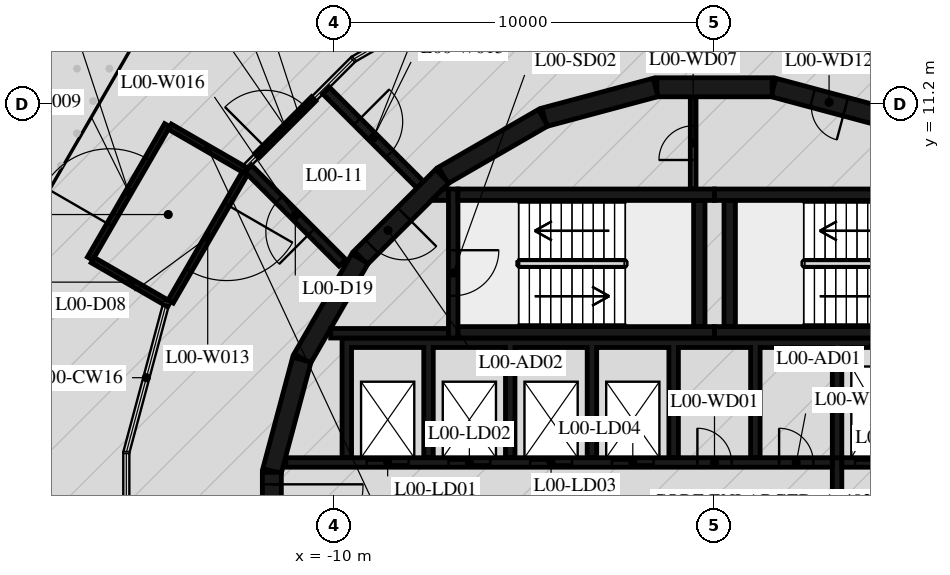
"""IFC4 building model, lengths in metres.
Left out: names, types, materials, properties, quantities, classifications, styles, units other than length and angle.
Written with IfcOpenShell. Run it as: python <this file> out.ifc"""

import sys

from ifc_helpers import new_model, si_unit, direction, frame, frame_2d, origin, place, context, subcontext, project, spatial, polyline, rectangle, outline, extrude, element, fill, save


model = new_model("IFC4")
c1 = context("Model", 3, precision=1e-05, world=origin(), true_north=direction((0.0, 1.0)))
c2 = subcontext(c1, "Body", "Model", "MODEL_VIEW")
j1 = project(units=[si_unit("LENGTHUNIT", "METRE"), si_unit("PLANEANGLEUNIT", "RADIAN")], contexts=[c1])
p1 = place(None, origin())
s1 = spatial("IfcSite", under=j1, at=p1, CompositionType="ELEMENT")
p2 = place(p1, origin())
s2 = spatial("IfcBuilding", under=s1, at=p2, CompositionType="ELEMENT")
p3 = place(p2, origin())
s3 = spatial("IfcBuildingStorey", under=s2, at=p3, CompositionType="ELEMENT", Elevation=0.0)
p4 = place(p3, frame((-12.032, 9.855, 0.0), z_axis=(0.0, 0.0, 1.0), x_axis=(0.70704865247, 0.707164905125, 0.0)))
e1 = element("IfcWall", 1, at=p4, inside=s3, PredefinedType="STANDARD", context=c2, shape_type="SweptSolid", body=[
    extrude(rectangle(XDim=2.1, YDim=0.16, at=frame_2d((1.05, 0.0))), origin(), (0.0, 0.0, 1.0), 8.5),
])
p5 = place(p4, frame((0.3, 0.0, 0.0)))
e2 = element("IfcOpeningElement", 2, at=p5, cuts=e1, PredefinedType="OPENING", context=c2, shape_type="SweptSolid", body=[
    extrude(rectangle(XDim=1.5, YDim=2.1, at=frame_2d((0.75, 1.05))), frame((0.0, 0.09, 0.0), z_axis=(0.0, -1.0, 0.0), x_axis=(1.0, 0.0, 0.0)), (0.0, 0.0, 1.0), 0.18),
])
p6 = place(p3, frame((4.479, 10.858, 0.0), z_axis=(0.0, 0.0, 1.0), x_axis=(-0.965948410781, 0.258734743916, 0.0)))
e3 = element("IfcWall", 3, at=p6, inside=s3, PredefinedType="SHEAR", context=c2, shape_type="SweptSolid", body=[
    extrude(rectangle(XDim=3.033, YDim=0.5, at=frame_2d((1.516, 0.0))), origin(), (0.0, 0.0, 1.0), 8.62),
])
p7 = place(p6, frame((1.066, 0.0, 0.0)))
e4 = element("IfcOpeningElement", 4, at=p7, cuts=e3, PredefinedType="OPENING", context=c2, shape_type="SweptSolid", body=[
    extrude(rectangle(XDim=0.9, YDim=2.1, at=frame_2d((0.45, 1.05))), frame((0.0, 0.26, 0.0), z_axis=(0.0, -1.0, 0.0), x_axis=(1.0, 0.0, 0.0)), (0.0, 0.0, 1.0), 0.52),
])
for number, where, z_axis, x_axis in (
    (5, (1.516, 11.647, 0.0), (0.0, 0.0, 1.0), (-1.0, 0.0, 0.0)),
    (6, (-1.55, 11.643, 0.0), (0.0, 0.0, 1.0), (-0.966, -0.259, 0.0)),
    (7, (-4.51, 10.845, 0.0), (0.0, 0.0, 1.0), (-0.866, -0.5, 0.0)),
):
    element("IfcWall", number, at=place(p3, frame(where, z_axis=z_axis, x_axis=x_axis)), inside=s3, PredefinedType="SHEAR", context=c2, shape_type="SweptSolid", body=[
        extrude(rectangle(XDim=3.033, YDim=0.5, at=frame_2d((1.516, 0.0))), origin(), (0.0, 0.0, 1.0), 8.62),
    ])
p8 = place(p3, frame((-7.164, 9.308, 0.0), z_axis=(0.0, 0.0, 1.0), x_axis=(-0.707106781187, -0.707106781187, 0.0)))
e8 = element("IfcWall", 8, at=p8, inside=s3, PredefinedType="SHEAR", context=c2, shape_type="SweptSolid", body=[
    extrude(rectangle(XDim=3.032, YDim=0.5, at=frame_2d((1.516, 0.0))), origin(), (0.0, 0.0, 1.0), 8.62),
])
p9 = place(p8, frame((1.416, 0.0, 0.0)))
e9 = element("IfcOpeningElement", 9, at=p9, cuts=e8, PredefinedType="OPENING", context=c2, shape_type="SweptSolid", body=[
    extrude(rectangle(XDim=1.2, YDim=2.1, at=frame_2d((0.6, 1.05))), frame((0.0, 0.26, 0.0), z_axis=(0.0, -1.0, 0.0), x_axis=(1.0, 0.0, 0.0)), (0.0, 0.0, 1.0), 0.52),
])
for number, where, z_axis, x_axis in (
    (10, (-9.329, 7.137, 0.0), (0.0, 0.0, 1.0), (-0.5, -0.866, 0.0)),
    (11, (-10.858, 4.479, 0.0), (0.0, 0.0, 1.0), (-0.259, -0.966, 0.0)),
):
    element("IfcWall", number, at=place(p3, frame(where, z_axis=z_axis, x_axis=x_axis)), inside=s3, PredefinedType="SHEAR", context=c2, shape_type="SweptSolid", body=[
        extrude(rectangle(XDim=3.033, YDim=0.5, at=frame_2d((1.516, 0.0))), origin(), (0.0, 0.0, 1.0), 8.62),
    ])
p10 = place(p3, frame((-11.647, 1.516, 0.0), z_axis=(0.0, 0.0, 1.0), x_axis=(0.0, -1.0, 0.0)))
e12 = element("IfcWall", 12, at=p10, inside=s3, PredefinedType="SHEAR", context=c2, shape_type="SweptSolid", body=[
    extrude(rectangle(XDim=3.033, YDim=0.5, at=frame_2d((1.516, 0.0))), origin(), (0.0, 0.0, 1.0), 8.62),
])
p11 = place(p10, frame((0.316, 0.0, 0.0)))
e13 = element("IfcOpeningElement", 13, at=p11, cuts=e12, PredefinedType="OPENING", context=c2, shape_type="SweptSolid", body=[
    extrude(rectangle(XDim=2.4, YDim=2.1, at=frame_2d((1.2, 1.05))), frame((0.0, 0.26, 0.0), z_axis=(0.0, -1.0, 0.0), x_axis=(1.0, 0.0, 0.0)), (0.0, 0.0, 1.0), 0.52),
])
for number, where, z_axis, x_axis in (
    (14, (0.0, 5.2, 0.0), (0.0, 0.0, 1.0), (1.0, 0.0, 0.0)),
    (15, (0.0, 8.82, 0.0), (0.0, 0.0, 1.0), (1.0, 0.0, 0.0)),
):
    element("IfcWall", number, at=place(p3, frame(where, z_axis=z_axis, x_axis=x_axis)), inside=s3, PredefinedType="SHEAR", context=c2, shape_type="SweptSolid", body=[
        extrude(rectangle(XDim=6.75, YDim=0.3, at=frame_2d((3.375, 0.0))), origin(), (0.0, 0.0, 1.0), 8.62),
    ])
p12 = place(p3, frame((0.4, 5.35, 0.0), z_axis=(0.0, 0.0, 1.0), x_axis=(0.0, 1.0, 0.0)))
e16 = element("IfcWall", 16, at=p12, inside=s3, PredefinedType="SHEAR", context=c2, shape_type="SweptSolid", body=[
    extrude(rectangle(XDim=3.32, YDim=0.3, at=frame_2d((1.66, 0.0))), origin(), (0.0, 0.0, 1.0), 8.62),
])
for number, where, z_axis, x_axis in (
    (17, (-6.75, 5.2, 0.0), (0.0, 0.0, 1.0), (1.0, 0.0, 0.0)),
    (18, (-6.75, 8.82, 0.0), (0.0, 0.0, 1.0), (1.0, 0.0, 0.0)),
):
    element("IfcWall", number, at=place(p3, frame(where, z_axis=z_axis, x_axis=x_axis)), inside=s3, PredefinedType="SHEAR", context=c2, shape_type="SweptSolid", body=[
        extrude(rectangle(XDim=6.75, YDim=0.3, at=frame_2d((3.375, 0.0))), origin(), (0.0, 0.0, 1.0), 8.62),
    ])
p13 = place(p3, frame((-0.4, 5.35, 0.0), z_axis=(0.0, 0.0, 1.0), x_axis=(0.0, 1.0, 0.0)))
e19 = element("IfcWall", 19, at=p13, inside=s3, PredefinedType="SHEAR", context=c2, shape_type="SweptSolid", body=[
    extrude(rectangle(XDim=3.32, YDim=0.3, at=frame_2d((1.66, 0.0))), origin(), (0.0, 0.0, 1.0), 8.62),
])
p14 = place(p3, frame((-6.875, 8.97, 0.0), z_axis=(0.0, 0.0, 1.0), x_axis=(0.0, -1.0, 0.0)))
e20 = element("IfcWall", 20, at=p14, inside=s3, PredefinedType="SHEAR", context=c2, shape_type="SweptSolid", body=[
    extrude(rectangle(XDim=3.92, YDim=0.25, at=frame_2d((1.96, 0.0))), origin(), (0.0, 0.0, 1.0), 8.62),
])
p15 = place(p14, frame((1.61, 0.0, 0.0)))
e21 = element("IfcOpeningElement", 21, at=p15, cuts=e20, PredefinedType="OPENING", context=c2, shape_type="SweptSolid", body=[
    extrude(rectangle(XDim=1.2, YDim=2.1, at=frame_2d((0.6, 1.05))), frame((0.0, 0.135, 0.0), z_axis=(0.0, -1.0, 0.0), x_axis=(1.0, 0.0, 0.0)), (0.0, 0.0, 1.0), 0.27),
])
p16 = place(p3, frame((-7.0, 5.175, 0.0), z_axis=(0.0, 0.0, 1.0), x_axis=(-1.0, 0.0, 0.0)))
e22 = element("IfcWall", 22, at=p16, inside=s3, PredefinedType="SHEAR", context=c2, shape_type="SweptSolid", body=[
    extrude(rectangle(XDim=3.1, YDim=0.25, at=frame_2d((1.55, 0.0))), origin(), (0.0, 0.0, 1.0), 8.62),
])
p17 = place(p3, origin())
e23 = element("IfcWall", 23, at=p17, inside=s3, PredefinedType="SHEAR", context=c2, shape_type="SweptSolid", body=[
    extrude(outline(polyline([(-7.148, 8.97), (-7.0, 8.97), (-7.0, 8.67), (-7.448, 8.67), (-7.148, 8.97)])), origin(), (0.0, 0.0, 1.0), 8.62),
])
p18 = place(p3, origin())
e24 = element("IfcWall", 24, at=p18, inside=s3, PredefinedType="SHEAR", context=c2, shape_type="SweptSolid", body=[
    extrude(outline(polyline([(-9.55, 4.8), (-7.65, 4.8), (-7.65, 1.9), (-7.4, 1.9), (-7.4, 4.8), (-5.5, 4.8), (-5.5, 1.9), (-5.25, 1.9), (-5.25, 4.8), (-3.35, 4.8), (-3.35, 1.9), (-3.1, 1.9), (-3.1, 4.8), (-1.2, 4.8), (-1.2, 1.9), (-0.95, 1.9), (-0.95, 4.8), (0.95, 4.8), (0.95, 1.9), (1.2, 1.9), (1.2, 4.8), (3.1, 4.8), (3.1, 1.9), (3.35, 1.9), (3.35, 4.8), (5.25, 4.8), (5.25, 1.9), (5.5, 1.9), (5.5, 4.8), (7.4, 4.8), (7.4, 1.9), (7.65, 1.9), (7.65, 4.8), (9.55, 4.8), (9.55, 1.9), (9.8, 1.9), (9.8, 4.8), (9.8, 5.05), (-9.8, 5.05), (-9.8, 4.8), (-9.8, 1.9), (-9.55, 1.9), (-9.55, 4.8)])), origin(), (0.0, 0.0, 1.0), 8.62),
])
p19 = place(p3, frame((-11.28, 1.775, 0.0), z_axis=(0.0, 0.0, 1.0), x_axis=(1.0, 0.0, 0.0)))
e25 = element("IfcWall", 25, at=p19, inside=s3, PredefinedType="SHEAR", context=c2, shape_type="SweptSolid", body=[
    extrude(rectangle(XDim=14.38, YDim=0.25, at=frame_2d((7.19, 0.0))), origin(), (0.0, 0.0, 1.0), 8.62),
])
p20 = place(p19, frame((2.13, 0.0, 0.0)))
e26 = element("IfcOpeningElement", 26, at=p20, cuts=e25, PredefinedType="OPENING", context=c2, shape_type="SweptSolid", body=[
    extrude(rectangle(XDim=1.1, YDim=2.1, at=frame_2d((0.55, 1.05))), frame((0.0, 0.135, 0.0), z_axis=(0.0, -1.0, 0.0), x_axis=(1.0, 0.0, 0.0)), (0.0, 0.0, 1.0), 0.27),
])
p21 = place(p19, frame((4.28, 0.0, 0.0)))
e27 = element("IfcOpeningElement", 27, at=p21, cuts=e25, PredefinedType="OPENING", context=c2, shape_type="SweptSolid", body=[
    extrude(rectangle(XDim=1.1, YDim=2.1, at=frame_2d((0.55, 1.05))), frame((0.0, 0.135, 0.0), z_axis=(0.0, -1.0, 0.0), x_axis=(1.0, 0.0, 0.0)), (0.0, 0.0, 1.0), 0.27),
])
p22 = place(p19, frame((6.43, 0.0, 0.0)))
e28 = element("IfcOpeningElement", 28, at=p22, cuts=e25, PredefinedType="OPENING", context=c2, shape_type="SweptSolid", body=[
    extrude(rectangle(XDim=1.1, YDim=2.1, at=frame_2d((0.55, 1.05))), frame((0.0, 0.135, 0.0), z_axis=(0.0, -1.0, 0.0), x_axis=(1.0, 0.0, 0.0)), (0.0, 0.0, 1.0), 0.27),
])
p23 = place(p19, frame((8.58, 0.0, 0.0)))
e29 = element("IfcOpeningElement", 29, at=p23, cuts=e25, PredefinedType="OPENING", context=c2, shape_type="SweptSolid", body=[
    extrude(rectangle(XDim=1.1, YDim=2.1, at=frame_2d((0.55, 1.05))), frame((0.0, 0.135, 0.0), z_axis=(0.0, -1.0, 0.0), x_axis=(1.0, 0.0, 0.0)), (0.0, 0.0, 1.0), 0.27),
])
p24 = place(p19, frame((10.83, 0.0, 0.0)))
e30 = element("IfcOpeningElement", 30, at=p24, cuts=e25, PredefinedType="OPENING", context=c2, shape_type="SweptSolid", body=[
    extrude(rectangle(XDim=0.9, YDim=2.1, at=frame_2d((0.45, 1.05))), frame((0.0, 0.135, 0.0), z_axis=(0.0, -1.0, 0.0), x_axis=(1.0, 0.0, 0.0)), (0.0, 0.0, 1.0), 0.27),
])
p25 = place(p19, frame((12.98, 0.0, 0.0)))
e31 = element("IfcOpeningElement", 31, at=p25, cuts=e25, PredefinedType="OPENING", context=c2, shape_type="SweptSolid", body=[
    extrude(rectangle(XDim=0.9, YDim=2.1, at=frame_2d((0.45, 1.05))), frame((0.0, 0.135, 0.0), z_axis=(0.0, -1.0, 0.0), x_axis=(1.0, 0.0, 0.0)), (0.0, 0.0, 1.0), 0.27),
])
p26 = place(p3, frame((3.35, 1.775, 0.0), z_axis=(0.0, 0.0, 1.0), x_axis=(1.0, 0.0, 0.0)))
e32 = element("IfcWall", 32, at=p26, inside=s3, PredefinedType="SHEAR", context=c2, shape_type="SweptSolid", body=[
    extrude(rectangle(XDim=7.93, YDim=0.25, at=frame_2d((3.965, 0.0))), origin(), (0.0, 0.0, 1.0), 8.62),
])
p27 = place(p26, frame((0.35, 0.0, 0.0)))
e33 = element("IfcOpeningElement", 33, at=p27, cuts=e32, PredefinedType="OPENING", context=c2, shape_type="SweptSolid", body=[
    extrude(rectangle(XDim=1.2, YDim=2.4, at=frame_2d((0.6, 1.2))), frame((0.0, 0.135, 0.0), z_axis=(0.0, -1.0, 0.0), x_axis=(1.0, 0.0, 0.0)), (0.0, 0.0, 1.0), 0.27),
])
p28 = place(p26, frame((2.5, 0.0, 0.0)))
e34 = element("IfcOpeningElement", 34, at=p28, cuts=e32, PredefinedType="OPENING", context=c2, shape_type="SweptSolid", body=[
    extrude(rectangle(XDim=1.2, YDim=2.4, at=frame_2d((0.6, 1.2))), frame((0.0, 0.135, 0.0), z_axis=(0.0, -1.0, 0.0), x_axis=(1.0, 0.0, 0.0)), (0.0, 0.0, 1.0), 0.27),
])
p29 = place(p26, frame((4.8, 0.0, 0.0)))
e35 = element("IfcOpeningElement", 35, at=p29, cuts=e32, PredefinedType="OPENING", context=c2, shape_type="SweptSolid", body=[
    extrude(rectangle(XDim=0.9, YDim=2.1, at=frame_2d((0.45, 1.05))), frame((0.0, 0.135, 0.0), z_axis=(0.0, -1.0, 0.0), x_axis=(1.0, 0.0, 0.0)), (0.0, 0.0, 1.0), 0.27),
])
p30 = place(p3, frame((3.225, -1.9, 0.0), z_axis=(0.0, 0.0, 1.0), x_axis=(0.0, 1.0, 0.0)))
e36 = element("IfcWall", 36, at=p30, inside=s3, PredefinedType="SHEAR", context=c2, shape_type="SweptSolid", body=[
    extrude(rectangle(XDim=3.8, YDim=0.25, at=frame_2d((1.9, 0.0))), origin(), (0.0, 0.0, 1.0), 8.62),
])
p31 = place(p3, frame((-0.562, 8.97, 0.0), z_axis=(0.0, 0.0, 1.0), x_axis=(0.0, 1.0, 0.0)))
e37 = element("IfcWall", 37, at=p31, inside=s3, PredefinedType="PARTITIONING", context=c2, shape_type="SweptSolid", body=[
    extrude(rectangle(XDim=2.427, YDim=0.15, at=frame_2d((1.214, 0.0))), origin(), (0.0, 0.0, 1.0), 8.62),
])
p32 = place(p31, frame((0.764, 0.0, 0.0)))
e38 = element("IfcOpeningElement", 38, at=p32, cuts=e37, PredefinedType="OPENING", context=c2, shape_type="SweptSolid", body=[
    extrude(rectangle(XDim=0.9, YDim=2.1, at=frame_2d((0.45, 1.05))), frame((0.0, 0.085, 0.0), z_axis=(0.0, -1.0, 0.0), x_axis=(1.0, 0.0, 0.0)), (0.0, 0.0, 1.0), 0.17),
])
p33 = place(p3, frame((-16.43, 7.14, 0.0), z_axis=(0.0, 0.0, 1.0), x_axis=(0.500651722248, 0.865648804661, 0.0)))
e39 = element("IfcWall", 39, at=p33, inside=s3, PredefinedType="PARTITIONING", context=c2, shape_type="SweptSolid", body=[
    extrude(rectangle(XDim=4.055, YDim=0.16, at=frame_2d((2.027, 0.0))), origin(), (0.0, 0.0, 1.0), 3.0),
])
p34 = place(p33, frame((1.027, 0.0, 0.0)))
e40 = element("IfcOpeningElement", 40, at=p34, cuts=e39, PredefinedType="OPENING", context=c2, shape_type="SweptSolid", body=[
    extrude(rectangle(XDim=2.0, YDim=2.4, at=frame_2d((1.0, 1.2))), frame((0.0, 0.09, 0.0), z_axis=(0.0, -1.0, 0.0), x_axis=(1.0, 0.0, 0.0)), (0.0, 0.0, 1.0), 0.18),
])
p35 = place(p3, frame((-14.331, 10.61, 0.0), z_axis=(0.0, 0.0, 1.0), x_axis=(0.866164575005, -0.499758870863, 0.0)))
e41 = element("IfcWall", 41, at=p35, inside=s3, PredefinedType="PARTITIONING", context=c2, shape_type="SweptSolid", body=[
    extrude(rectangle(XDim=2.322, YDim=0.16, at=frame_2d((1.161, 0.0))), origin(), (0.0, 0.0, 1.0), 3.0),
])
p36 = place(p3, frame((-14.35, 5.94, 0.0), z_axis=(0.0, 0.0, 1.0), x_axis=(-0.866138304741, 0.499804398801, 0.0)))
e42 = element("IfcWall", 42, at=p36, inside=s3, PredefinedType="PARTITIONING", context=c2, shape_type="SweptSolid", body=[
    extrude(rectangle(XDim=2.321, YDim=0.16, at=frame_2d((1.161, 0.0))), origin(), (0.0, 0.0, 1.0), 3.0),
])
p37 = place(p3, frame((-12.36, 9.381, 0.0), z_axis=(0.0, 0.0, 1.0), x_axis=(-0.500648288507, -0.86565079057, 0.0)))
e43 = element("IfcWall", 43, at=p37, inside=s3, PredefinedType="PARTITIONING", context=c2, shape_type="SweptSolid", body=[
    extrude(rectangle(XDim=3.895, YDim=0.16, at=frame_2d((1.947, 0.0))), origin(), (0.0, 0.0, 1.0), 3.0),
])
p38 = place(p37, frame((0.948, 0.0, 0.0)))
e44 = element("IfcOpeningElement", 44, at=p38, cuts=e43, PredefinedType="OPENING", context=c2, shape_type="SweptSolid", body=[
    extrude(rectangle(XDim=2.0, YDim=2.4, at=frame_2d((1.0, 1.2))), frame((0.0, 0.09, 0.0), z_axis=(0.0, -1.0, 0.0), x_axis=(1.0, 0.0, 0.0)), (0.0, 0.0, 1.0), 0.18),
])
p39 = place(p3, frame((-10.22, 11.56, 0.0), z_axis=(0.0, 0.0, 1.0), x_axis=(0.707106781187, -0.707106781187, 0.0)))
e45 = element("IfcWall", 45, at=p39, inside=s3, PredefinedType="PARTITIONING", context=c2, shape_type="SweptSolid", body=[
    extrude(rectangle(XDim=3.507, YDim=0.25, at=frame_2d((1.754, 0.0))), origin(), (0.0, 0.0, 1.0), 8.62),
])
p40 = place(p39, frame((1.154, 0.0, 0.0)))
e46 = element("IfcOpeningElement", 46, at=p40, cuts=e45, PredefinedType="OPENING", context=c2, shape_type="SweptSolid", body=[
    extrude(rectangle(XDim=1.2, YDim=2.1, at=frame_2d((0.6, 1.05))), frame((0.0, 0.135, 0.0), z_axis=(0.0, -1.0, 0.0), x_axis=(1.0, 0.0, 0.0)), (0.0, 0.0, 1.0), 0.27),
])
p41 = place(p3, frame((-9.79, 7.03, 0.0), z_axis=(0.0, 0.0, 1.0), x_axis=(-0.707106781187, 0.707106781187, 0.0)))
e47 = element("IfcWall", 47, at=p41, inside=s3, PredefinedType="PARTITIONING", context=c2, shape_type="SweptSolid", body=[
    extrude(rectangle(XDim=3.507, YDim=0.25, at=frame_2d((1.754, 0.0))), origin(), (0.0, 0.0, 1.0), 8.62),
])
p42 = place(p41, frame((1.154, 0.0, 0.0)))
e48 = element("IfcOpeningElement", 48, at=p42, cuts=e47, PredefinedType="OPENING", context=c2, shape_type="SweptSolid", body=[
    extrude(rectangle(XDim=1.2, YDim=2.1, at=frame_2d((0.6, 1.05))), frame((0.0, 0.135, 0.0), z_axis=(0.0, -1.0, 0.0), x_axis=(1.0, 0.0, 0.0)), (0.0, 0.0, 1.0), 0.27),
])
p43 = place(p5, origin())
e49 = element("IfcDoor", 49, at=p43, inside=s3, OperationType="DOUBLE_DOOR_SINGLE_SWING", PredefinedType="DOOR", context=c2, shape_type="SweptSolid", body=[
    extrude(rectangle(XDim=1.5, YDim=2.1, at=frame_2d((0.75, 1.05))), frame((0.0, 0.025, 0.0), z_axis=(0.0, -1.0, 0.0), x_axis=(1.0, 0.0, 0.0)), (0.0, 0.0, 1.0), 0.05),
])
fill(e2, e49)
p44 = place(p15, origin())
e50 = element("IfcDoor", 50, at=p44, inside=s3, OperationType="SINGLE_SWING_LEFT", PredefinedType="DOOR", context=c2, shape_type="SweptSolid", body=[
    extrude(rectangle(XDim=1.2, YDim=2.1, at=frame_2d((0.6, 1.05))), frame((0.0, 0.025, 0.0), z_axis=(0.0, -1.0, 0.0), x_axis=(1.0, 0.0, 0.0)), (0.0, 0.0, 1.0), 0.05),
])
fill(e21, e50)
p45 = place(p9, origin())
e51 = element("IfcDoor", 51, at=p45, inside=s3, OperationType="SINGLE_SWING_RIGHT", PredefinedType="DOOR", context=c2, shape_type="SweptSolid", body=[
    extrude(rectangle(XDim=1.2, YDim=2.1, at=frame_2d((0.6, 1.05))), frame((0.0, 0.025, 0.0), z_axis=(0.0, -1.0, 0.0), x_axis=(1.0, 0.0, 0.0)), (0.0, 0.0, 1.0), 0.05),
])
fill(e9, e51)
p46 = place(p11, origin())
e52 = element("IfcDoor", 52, at=p46, inside=s3, OperationType="DOUBLE_DOOR_SINGLE_SWING", PredefinedType="DOOR", context=c2, shape_type="SweptSolid", body=[
    extrude(rectangle(XDim=2.4, YDim=2.1, at=frame_2d((1.2, 1.05))), frame((0.0, 0.025, 0.0), z_axis=(0.0, -1.0, 0.0), x_axis=(1.0, 0.0, 0.0)), (0.0, 0.0, 1.0), 0.05),
])
fill(e13, e52)
p47 = place(p20, origin())
e53 = element("IfcDoor", 53, at=p47, inside=s3, OperationType="DOUBLE_DOOR_SLIDING", PredefinedType="DOOR", context=c2, shape_type="SweptSolid", body=[
    extrude(rectangle(XDim=1.1, YDim=2.1, at=frame_2d((0.55, 1.05))), frame((0.0, 0.025, 0.0), z_axis=(0.0, -1.0, 0.0), x_axis=(1.0, 0.0, 0.0)), (0.0, 0.0, 1.0), 0.05),
])
fill(e26, e53)
p48 = place(p21, origin())
e54 = element("IfcDoor", 54, at=p48, inside=s3, OperationType="DOUBLE_DOOR_SLIDING", PredefinedType="DOOR", context=c2, shape_type="SweptSolid", body=[
    extrude(rectangle(XDim=1.1, YDim=2.1, at=frame_2d((0.55, 1.05))), frame((0.0, 0.025, 0.0), z_axis=(0.0, -1.0, 0.0), x_axis=(1.0, 0.0, 0.0)), (0.0, 0.0, 1.0), 0.05),
])
fill(e27, e54)
p49 = place(p22, origin())
e55 = element("IfcDoor", 55, at=p49, inside=s3, OperationType="DOUBLE_DOOR_SLIDING", PredefinedType="DOOR", context=c2, shape_type="SweptSolid", body=[
    extrude(rectangle(XDim=1.1, YDim=2.1, at=frame_2d((0.55, 1.05))), frame((0.0, 0.025, 0.0), z_axis=(0.0, -1.0, 0.0), x_axis=(1.0, 0.0, 0.0)), (0.0, 0.0, 1.0), 0.05),
])
fill(e28, e55)
p50 = place(p23, origin())
e56 = element("IfcDoor", 56, at=p50, inside=s3, OperationType="DOUBLE_DOOR_SLIDING", PredefinedType="DOOR", context=c2, shape_type="SweptSolid", body=[
    extrude(rectangle(XDim=1.1, YDim=2.1, at=frame_2d((0.55, 1.05))), frame((0.0, 0.025, 0.0), z_axis=(0.0, -1.0, 0.0), x_axis=(1.0, 0.0, 0.0)), (0.0, 0.0, 1.0), 0.05),
])
fill(e29, e56)
p51 = place(p27, origin())
e57 = element("IfcDoor", 57, at=p51, inside=s3, OperationType="DOUBLE_DOOR_SLIDING", PredefinedType="DOOR", context=c2, shape_type="SweptSolid", body=[
    extrude(rectangle(XDim=1.2, YDim=2.4, at=frame_2d((0.6, 1.2))), frame((0.0, 0.025, 0.0), z_axis=(0.0, -1.0, 0.0), x_axis=(1.0, 0.0, 0.0)), (0.0, 0.0, 1.0), 0.05),
])
fill(e33, e57)
p52 = place(p24, origin())
e58 = element("IfcDoor", 58, at=p52, inside=s3, OperationType="SINGLE_SWING_RIGHT", PredefinedType="DOOR", context=c2, shape_type="SweptSolid", body=[
    extrude(rectangle(XDim=0.9, YDim=2.1, at=frame_2d((0.45, 1.05))), frame((0.0, 0.025, 0.0), z_axis=(0.0, -1.0, 0.0), x_axis=(1.0, 0.0, 0.0)), (0.0, 0.0, 1.0), 0.05),
])
fill(e30, e58)
p53 = place(p25, origin())
e59 = element("IfcDoor", 59, at=p53, inside=s3, OperationType="SINGLE_SWING_LEFT", PredefinedType="DOOR", context=c2, shape_type="SweptSolid", body=[
    extrude(rectangle(XDim=0.9, YDim=2.1, at=frame_2d((0.45, 1.05))), frame((0.0, 0.025, 0.0), z_axis=(0.0, -1.0, 0.0), x_axis=(1.0, 0.0, 0.0)), (0.0, 0.0, 1.0), 0.05),
])
fill(e31, e59)
p54 = place(p32, origin())
e60 = element("IfcDoor", 60, at=p54, inside=s3, OperationType="SINGLE_SWING_RIGHT", PredefinedType="DOOR", context=c2, shape_type="SweptSolid", body=[
    extrude(rectangle(XDim=0.9, YDim=2.1, at=frame_2d((0.45, 1.05))), frame((0.0, 0.025, 0.0), z_axis=(0.0, -1.0, 0.0), x_axis=(1.0, 0.0, 0.0)), (0.0, 0.0, 1.0), 0.05),
])
fill(e38, e60)
p55 = place(p7, origin())
e61 = element("IfcDoor", 61, at=p55, inside=s3, OperationType="SINGLE_SWING_LEFT", PredefinedType="DOOR", context=c2, shape_type="SweptSolid", body=[
    extrude(rectangle(XDim=0.9, YDim=2.1, at=frame_2d((0.45, 1.05))), frame((0.0, 0.025, 0.0), z_axis=(0.0, -1.0, 0.0), x_axis=(1.0, 0.0, 0.0)), (0.0, 0.0, 1.0), 0.05),
])
fill(e4, e61)
p56 = place(p38, origin())
e62 = element("IfcDoor", 62, at=p56, inside=s3, OperationType="DOUBLE_DOOR_SINGLE_SWING", PredefinedType="DOOR", context=c2, shape_type="SweptSolid", body=[
    extrude(rectangle(XDim=2.0, YDim=2.4, at=frame_2d((1.0, 1.2))), frame((0.0, 0.025, 0.0), z_axis=(0.0, -1.0, 0.0), x_axis=(1.0, 0.0, 0.0)), (0.0, 0.0, 1.0), 0.05),
])
fill(e44, e62)
p57 = place(p34, origin())
e63 = element("IfcDoor", 63, at=p57, inside=s3, OperationType="DOUBLE_DOOR_SINGLE_SWING", PredefinedType="DOOR", context=c2, shape_type="SweptSolid", body=[
    extrude(rectangle(XDim=2.0, YDim=2.4, at=frame_2d((1.0, 1.2))), frame((0.0, 0.025, 0.0), z_axis=(0.0, -1.0, 0.0), x_axis=(1.0, 0.0, 0.0)), (0.0, 0.0, 1.0), 0.05),
])
fill(e40, e63)
p58 = place(p40, origin())
e64 = element("IfcDoor", 64, at=p58, inside=s3, OperationType="SINGLE_SWING_LEFT", PredefinedType="DOOR", context=c2, shape_type="SweptSolid", body=[
    extrude(rectangle(XDim=1.2, YDim=2.1, at=frame_2d((0.6, 1.05))), frame((0.0, 0.025, 0.0), z_axis=(0.0, -1.0, 0.0), x_axis=(1.0, 0.0, 0.0)), (0.0, 0.0, 1.0), 0.05),
])
fill(e46, e64)
p59 = place(p42, origin())
e65 = element("IfcDoor", 65, at=p59, inside=s3, OperationType="SINGLE_SWING_LEFT", PredefinedType="DOOR", context=c2, shape_type="SweptSolid", body=[
    extrude(rectangle(XDim=1.2, YDim=2.1, at=frame_2d((0.6, 1.05))), frame((0.0, 0.025, 0.0), z_axis=(0.0, -1.0, 0.0), x_axis=(1.0, 0.0, 0.0)), (0.0, 0.0, 1.0), 0.05),
])
fill(e48, e65)
save(model, sys.argv[1])
